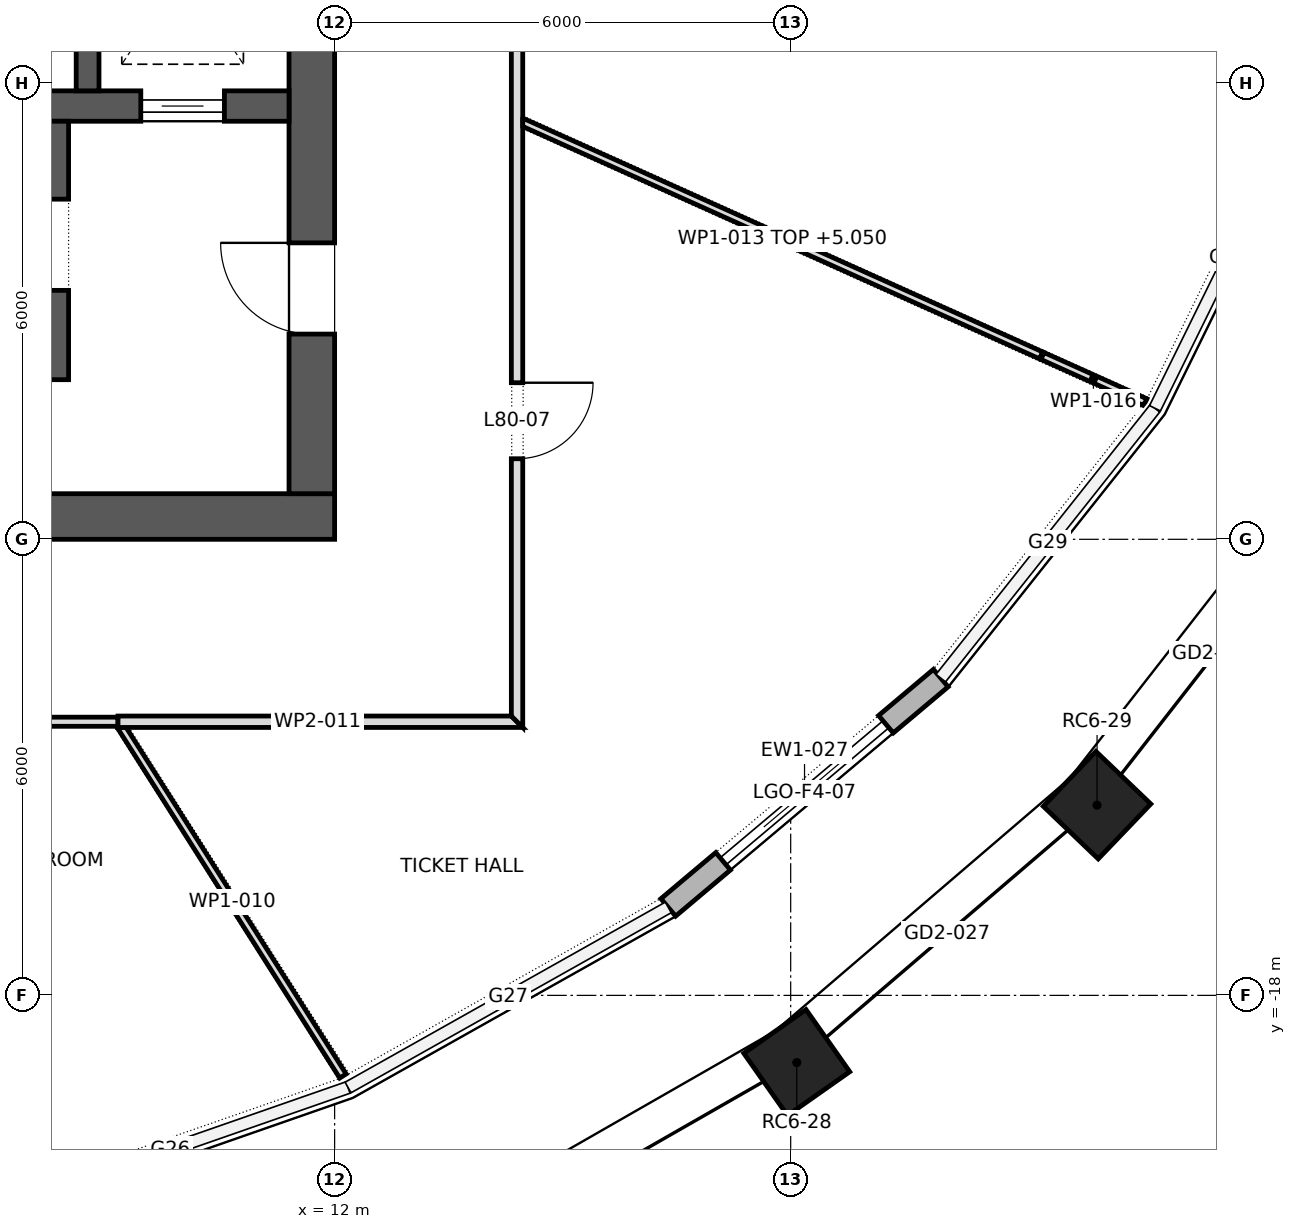
"""IFC4 building model, lengths in metres.
Left out: names, types, materials, properties, quantities, classifications, styles, units other than length and angle.
Written with IfcOpenShell. Run it as: python <this file> out.ifc"""

import sys

from ifc_helpers import new_model, si_unit, direction, frame, frame_2d, origin, origin_2d, place, context, subcontext, project, spatial, polyline, rectangle, outline, extrude, element, fill, save


model = new_model("IFC4")
c1 = context("Model", 3, precision=1e-05, world=origin(), true_north=direction((0.0, 1.0)))
c2 = subcontext(c1, "Body", "Model", "MODEL_VIEW")
j1 = project(units=[si_unit("LENGTHUNIT", "METRE"), si_unit("PLANEANGLEUNIT", "RADIAN")], contexts=[c1])
p1 = place(None, origin())
s1 = spatial("IfcSite", under=j1, at=p1, CompositionType="ELEMENT")
p2 = place(p1, origin())
s2 = spatial("IfcBuilding", under=s1, at=p2, CompositionType="ELEMENT")
p3 = place(p2, frame((0.0, 0.0, 343.3)))
s3 = spatial("IfcBuildingStorey", under=s2, at=p3, CompositionType="ELEMENT", Elevation=343.3)
for number, where, z_axis, x_axis in (
    (1, (18.08, -18.884, 0.0), (0.0, 0.0, 1.0), (0.818, 0.575, 0.0)),
    (2, (22.031, -15.497, 0.0), (0.0, 0.0, 1.0), (0.692, 0.722, 0.0)),
):
    element("IfcColumn", number, at=place(p3, frame(where, z_axis=z_axis, x_axis=x_axis)), inside=s3, PredefinedType="COLUMN", context=c2, shape_type="SweptSolid", body=[
        extrude(rectangle(XDim=1.0, YDim=1.0, at=origin_2d()), origin(), (0.0, 0.0, 1.0), 6.0),
    ])
p4 = place(p3, frame((-12.0, -11.7, 0.0), z_axis=(0.0, 0.0, 1.0), x_axis=(1.0, 0.0, 0.0)))
e3 = element("IfcWall", 3, at=p4, inside=s3, PredefinedType="SHEAR", context=c2, shape_type="SweptSolid", body=[
    extrude(rectangle(XDim=24.0, YDim=0.6, at=frame_2d((12.0, 0.0))), origin(), (0.0, 0.0, 1.0), 6.0),
])
p5 = place(p4, frame((9.975, 0.0, 0.0)))
e4 = element("IfcOpeningElement", 4, at=p5, cuts=e3, PredefinedType="OPENING", context=c2, shape_type="SweptSolid", body=[
    extrude(rectangle(XDim=0.9, YDim=2.1, at=frame_2d((0.45, 1.05))), frame((0.0, 0.312, 0.0), z_axis=(0.0, -1.0, 0.0), x_axis=(1.0, 0.0, 0.0)), (0.0, 0.0, 1.0), 0.624),
])
p6 = place(p4, frame((4.6, 0.0, 0.0)))
e5 = element("IfcOpeningElement", 5, at=p6, cuts=e3, PredefinedType="OPENING", context=c2, shape_type="SweptSolid", body=[
    extrude(rectangle(XDim=0.8, YDim=2.1, at=frame_2d((0.4, 1.05))), frame((0.0, 0.312, 0.0), z_axis=(0.0, -1.0, 0.0), x_axis=(1.0, 0.0, 0.0)), (0.0, 0.0, 1.0), 0.624),
])
p7 = place(p4, frame((7.0, 0.0, 0.0)))
e6 = element("IfcOpeningElement", 6, at=p7, cuts=e3, PredefinedType="OPENING", context=c2, shape_type="SweptSolid", body=[
    extrude(rectangle(XDim=0.8, YDim=2.1, at=frame_2d((0.4, 1.05))), frame((0.0, 0.312, 0.0), z_axis=(0.0, -1.0, 0.0), x_axis=(1.0, 0.0, 0.0)), (0.0, 0.0, 1.0), 0.624),
])
p8 = place(p4, frame((15.85, 0.0, 0.0)))
e7 = element("IfcOpeningElement", 7, at=p8, cuts=e3, PredefinedType="OPENING", context=c2, shape_type="SweptSolid", body=[
    extrude(rectangle(XDim=0.8, YDim=2.1, at=frame_2d((0.4, 1.05))), frame((0.0, 0.312, 0.0), z_axis=(0.0, -1.0, 0.0), x_axis=(1.0, 0.0, 0.0)), (0.0, 0.0, 1.0), 0.624),
])
p9 = place(p3, frame((11.7, -11.4, 0.0), z_axis=(0.0, 0.0, 1.0), x_axis=(0.0, 1.0, 0.0)))
e8 = element("IfcWall", 8, at=p9, inside=s3, PredefinedType="SHEAR", context=c2, shape_type="SweptSolid", body=[
    extrude(rectangle(XDim=22.8, YDim=0.6, at=frame_2d((11.4, 0.0))), origin(), (0.0, 0.0, 1.0), 6.0),
])
p10 = place(p9, frame((10.2, 0.0, 0.0)))
e9 = element("IfcOpeningElement", 9, at=p10, cuts=e8, PredefinedType="OPENING", context=c2, shape_type="SweptSolid", body=[
    extrude(rectangle(XDim=2.4, YDim=2.1, at=frame_2d((1.2, 1.05))), frame((0.0, 0.312, 0.0), z_axis=(0.0, -1.0, 0.0), x_axis=(1.0, 0.0, 0.0)), (0.0, 0.0, 1.0), 0.624),
])
p11 = place(p9, frame((19.5, 0.0, 0.0)))
e10 = element("IfcOpeningElement", 10, at=p11, cuts=e8, PredefinedType="OPENING", context=c2, shape_type="SweptSolid", body=[
    extrude(rectangle(XDim=1.2, YDim=2.1, at=frame_2d((0.6, 1.05))), frame((0.0, 0.312, 0.0), z_axis=(0.0, -1.0, 0.0), x_axis=(1.0, 0.0, 0.0)), (0.0, 0.0, 1.0), 0.624),
])
p12 = place(p9, frame((2.1, 0.0, 0.0)))
e11 = element("IfcOpeningElement", 11, at=p12, cuts=e8, PredefinedType="OPENING", context=c2, shape_type="SweptSolid", body=[
    extrude(rectangle(XDim=1.2, YDim=2.1, at=frame_2d((0.6, 1.05))), frame((0.0, 0.312, 0.0), z_axis=(0.0, -1.0, 0.0), x_axis=(1.0, 0.0, 0.0)), (0.0, 0.0, 1.0), 0.624),
])
p13 = place(p3, frame((-11.4, -6.3, 0.0), z_axis=(0.0, 0.0, 1.0), x_axis=(1.0, 0.0, 0.0)))
e12 = element("IfcWall", 12, at=p13, inside=s3, PredefinedType="SHEAR", context=c2, shape_type="SweptSolid", body=[
    extrude(rectangle(XDim=22.8, YDim=0.4, at=frame_2d((11.4, 0.0))), origin(), (0.0, 0.0, 1.0), 6.0),
])
p14 = place(p13, frame((20.85, 0.0, 0.0)))
e13 = element("IfcOpeningElement", 13, at=p14, cuts=e12, PredefinedType="OPENING", context=c2, shape_type="SweptSolid", body=[
    extrude(rectangle(XDim=1.1, YDim=2.1, at=frame_2d((0.55, 1.05))), frame((0.0, 0.212, 0.0), z_axis=(0.0, -1.0, 0.0), x_axis=(1.0, 0.0, 0.0)), (0.0, 0.0, 1.0), 0.424),
])
p15 = place(p3, frame((8.75, -6.1, 0.0), z_axis=(0.0, 0.0, 1.0), x_axis=(0.0, 1.0, 0.0)))
e14 = element("IfcWall", 14, at=p15, inside=s3, PredefinedType="SHEAR", context=c2, shape_type="SweptSolid", body=[
    extrude(rectangle(XDim=2.9, YDim=0.3, at=frame_2d((1.45, 0.0))), origin(), (0.0, 0.0, 1.0), 6.0),
])
p16 = place(p3, frame((16.39, -16.843, 0.0), z_axis=(0.0, 0.0, 1.0), x_axis=(0.765128700347, 0.643877373344, 0.0)))
e15 = element("IfcWall", 15, at=p16, inside=s3, PredefinedType="STANDARD", context=c2, shape_type="SweptSolid", body=[
    extrude(outline(polyline([(0.0, -0.15), (4.686, -0.15), (4.686, 0.15), (0.0, 0.15), (0.0, -0.15)])), origin(), (0.0, 0.0, 1.0), 5.65),
])
p17 = place(p16, frame((0.943, 0.0, 0.0)))
e16 = element("IfcOpeningElement", 16, at=p17, cuts=e15, PredefinedType="OPENING", context=c2, shape_type="SweptSolid", body=[
    extrude(rectangle(XDim=2.8, YDim=5.2, at=frame_2d((1.4, 2.6))), frame((0.0, 0.162, 0.0), z_axis=(0.0, -1.0, 0.0), x_axis=(1.0, 0.0, 0.0)), (0.0, 0.0, 1.0), 0.324),
])
p18 = place(p3, frame((8.375, -9.9, 0.0), z_axis=(0.0, 0.0, 1.0), x_axis=(0.0, 1.0, 0.0)))
e17 = element("IfcWall", 17, at=p18, inside=s3, PredefinedType="SHEAR", context=c2, shape_type="SweptSolid", body=[
    extrude(rectangle(XDim=3.4, YDim=0.25, at=frame_2d((1.7, 0.0))), origin(), (0.0, 0.0, 1.0), 5.65),
])
p19 = place(p18, frame((1.175, 0.0, 0.0)))
e18 = element("IfcOpeningElement", 18, at=p19, cuts=e17, PredefinedType="OPENING", context=c2, shape_type="SweptSolid", body=[
    extrude(rectangle(XDim=1.2, YDim=2.1, at=frame_2d((0.6, 1.05))), frame((0.0, 0.137, 0.0), z_axis=(0.0, -1.0, 0.0), x_axis=(1.0, 0.0, 0.0)), (0.0, 0.0, 1.0), 0.274),
])
p20 = place(p3, frame((9.15, -14.4, 0.0), z_axis=(0.0, 0.0, 1.0), x_axis=(-1.0, 0.0, 0.0)))
e19 = element("IfcWall", 19, at=p20, inside=s3, PredefinedType="PARTITIONING", context=c2, shape_type="SweptSolid", body=[
    extrude(rectangle(XDim=10.84, YDim=0.12, at=frame_2d((5.42, 0.0))), origin(), (0.0, 0.0, 1.0), 5.65),
])
p21 = place(p20, frame((4.92, 0.0, 0.0)))
e20 = element("IfcOpeningElement", 20, at=p21, cuts=e19, PredefinedType="OPENING", context=c2, shape_type="SweptSolid", body=[
    extrude(rectangle(XDim=1.0, YDim=2.1, at=frame_2d((0.5, 1.05))), frame((0.0, 0.072, 0.0), z_axis=(0.0, -1.0, 0.0), x_axis=(1.0, 0.0, 0.0)), (0.0, 0.0, 1.0), 0.144),
])
p22 = place(p3, frame((9.171, -14.433, 0.0), z_axis=(0.0, 0.0, 1.0), x_axis=(0.535999066998, -0.844218573698, 0.0)))
e21 = element("IfcWall", 21, at=p22, inside=s3, PredefinedType="PARTITIONING", context=c2, shape_type="SweptSolid", body=[
    extrude(outline(polyline([(5.481, 0.05), (3.681, 0.05), (1.881, 0.05), (0.081, 0.05), (0.024, -0.04), (0.011, -0.032), (0.0, -0.05), (0.0, -0.05), (1.827, -0.05), (3.654, -0.05), (5.481, -0.05), (5.481, 0.05)])), origin(), (0.0, 0.0, 1.0), 5.65),
])
p23 = place(p3, frame((14.475, -14.4, 0.0), z_axis=(0.0, 0.0, 1.0), x_axis=(-1.0, 0.0, 0.0)))
e22 = element("IfcWall", 22, at=p23, inside=s3, PredefinedType="PARTITIONING", context=c2, shape_type="SweptSolid", body=[
    extrude(outline(polyline([(5.325, 0.075), (3.55, 0.075), (1.775, 0.075), (0.0, 0.075), (0.15, -0.075), (1.875, -0.075), (3.6, -0.075), (5.325, -0.075), (5.325, 0.075)])), origin(), (0.0, 0.0, 1.0), 5.65),
])
p24 = place(p3, frame((14.4, -14.475, 0.0), z_axis=(0.0, 0.0, 1.0), x_axis=(0.0, 1.0, 0.0)))
e23 = element("IfcWall", 23, at=p24, inside=s3, PredefinedType="PARTITIONING", context=c2, shape_type="SweptSolid", body=[
    extrude(outline(polyline([(0.0, -0.075), (1.93, -0.075), (3.86, -0.075), (5.79, -0.075), (7.72, -0.075), (9.65, -0.075), (11.58, -0.075), (13.51, -0.075), (15.44, -0.075), (17.37, -0.075), (19.3, -0.075), (21.23, -0.075), (23.16, -0.075), (25.09, -0.075), (27.02, -0.075), (28.95, -0.075), (28.8, 0.075), (26.89, 0.075), (24.98, 0.075), (23.07, 0.075), (21.16, 0.075), (19.25, 0.075), (17.34, 0.075), (15.43, 0.075), (13.52, 0.075), (11.61, 0.075), (9.7, 0.075), (7.79, 0.075), (5.88, 0.075), (3.97, 0.075), (2.06, 0.075), (0.15, 0.075), (0.0, -0.075)])), origin(), (0.0, 0.0, 1.0), 5.65),
])
p25 = place(p24, frame((3.535, 0.0, 0.0)))
e24 = element("IfcOpeningElement", 24, at=p25, cuts=e23, PredefinedType="OPENING", context=c2, shape_type="SweptSolid", body=[
    extrude(rectangle(XDim=1.0, YDim=2.1, at=frame_2d((0.5, 1.05))), frame((0.0, 0.087, 0.0), z_axis=(0.0, -1.0, 0.0), x_axis=(1.0, 0.0, 0.0)), (0.0, 0.0, 1.0), 0.174),
])
p26 = place(p24, frame((12.575, 0.0, 0.0)))
e25 = element("IfcOpeningElement", 25, at=p26, cuts=e23, PredefinedType="OPENING", context=c2, shape_type="SweptSolid", body=[
    extrude(rectangle(XDim=1.0, YDim=2.1, at=frame_2d((0.5, 1.05))), frame((0.0, 0.087, 0.0), z_axis=(0.0, -1.0, 0.0), x_axis=(1.0, 0.0, 0.0)), (0.0, 0.0, 1.0), 0.174),
])
p27 = place(p3, frame((14.455, -6.505, 0.0), z_axis=(0.0, 0.0, 1.0), x_axis=(0.912053465354, -0.410071306403, 0.0)))
e26 = element("IfcWall", 26, at=p27, inside=s3, PredefinedType="PARTITIONING", context=c2, shape_type="SweptSolid", body=[
    extrude(outline(polyline([(0.0, 0.05), (0.0, 0.05), (0.045, -0.05), (1.911, -0.05), (3.777, -0.05), (5.643, -0.05), (7.509, -0.05), (7.509, 0.05), (5.632, 0.05), (3.755, 0.05), (1.877, 0.05), (0.0, 0.05)])), origin(), (0.0, 0.0, 1.0), 5.05),
])
p28 = place(p3, frame((21.303, -9.584, 0.0), z_axis=(0.0, 0.0, 1.0), x_axis=(0.911976522447, -0.410242394816, 0.0)))
e27 = element("IfcWall", 27, at=p28, inside=s3, PredefinedType="PARTITIONING", context=c2, shape_type="SweptSolid", body=[
    extrude(outline(polyline([(0.0, -0.05), (1.48, -0.05), (1.493, 0.001), (1.494, 0.041), (1.494, 0.05), (0.0, 0.05), (0.0, -0.05)])), origin(), (0.0, 0.0, 1.0), 5.65),
])
p29 = place(p17, origin())
e28 = element("IfcDoor", 28, at=p29, inside=s3, OperationType="DOUBLE_DOOR_SLIDING", PredefinedType="DOOR", context=c2, shape_type="SweptSolid", body=[
    extrude(rectangle(XDim=2.8, YDim=5.2, at=frame_2d((1.4, 2.6))), frame((0.0, 0.025, 0.0), z_axis=(0.0, -1.0, 0.0), x_axis=(1.0, 0.0, 0.0)), (0.0, 0.0, 1.0), 0.05),
])
fill(e16, e28)
p30 = place(p14, origin())
e29 = element("IfcDoor", 29, at=p30, inside=s3, OperationType="SLIDING_TO_LEFT", PredefinedType="DOOR", context=c2, shape_type="SweptSolid", body=[
    extrude(rectangle(XDim=1.1, YDim=2.1, at=frame_2d((0.55, 1.05))), frame((0.0, 0.025, 0.0), z_axis=(0.0, -1.0, 0.0), x_axis=(1.0, 0.0, 0.0)), (0.0, 0.0, 1.0), 0.05),
])
fill(e13, e29)
p31 = place(p19, origin())
e30 = element("IfcDoor", 30, at=p31, inside=s3, OperationType="SINGLE_SWING_LEFT", PredefinedType="DOOR", context=c2, shape_type="SweptSolid", body=[
    extrude(rectangle(XDim=1.2, YDim=2.1, at=frame_2d((0.6, 1.05))), frame((0.0, 0.025, 0.0), z_axis=(0.0, -1.0, 0.0), x_axis=(1.0, 0.0, 0.0)), (0.0, 0.0, 1.0), 0.05),
])
fill(e18, e30)
p32 = place(p12, origin())
e31 = element("IfcDoor", 31, at=p32, inside=s3, OperationType="SINGLE_SWING_LEFT", PredefinedType="DOOR", context=c2, shape_type="SweptSolid", body=[
    extrude(rectangle(XDim=1.2, YDim=2.1, at=frame_2d((0.6, 1.05))), frame((0.0, 0.025, 0.0), z_axis=(0.0, -1.0, 0.0), x_axis=(1.0, 0.0, 0.0)), (0.0, 0.0, 1.0), 0.05),
])
fill(e11, e31)
p33 = place(p25, frame((1.0, 0.0, 0.0), z_axis=(0.0, 0.0, 1.0), x_axis=(-1.0, 0.0, 0.0)))
e32 = element("IfcDoor", 32, at=p33, inside=s3, OperationType="SINGLE_SWING_RIGHT", PredefinedType="DOOR", context=c2, shape_type="SweptSolid", body=[
    extrude(rectangle(XDim=1.0, YDim=2.1, at=frame_2d((0.5, 1.05))), frame((0.0, 0.025, 0.0), z_axis=(0.0, -1.0, 0.0), x_axis=(1.0, 0.0, 0.0)), (0.0, 0.0, 1.0), 0.05),
])
fill(e24, e32)
save(model, sys.argv[1])
